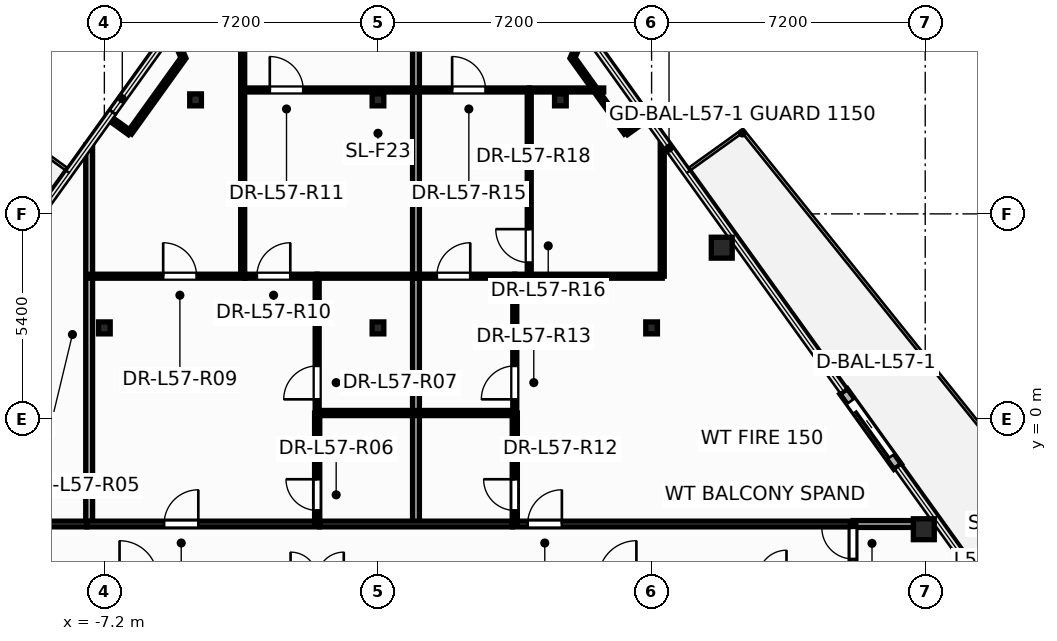
"""IFC4 building model, lengths in metres.
Left out: names, types, materials, properties, quantities, classifications, styles, units other than length and angle.
Written with IfcOpenShell. Run it as: python <this file> out.ifc"""

import sys

from ifc_helpers import new_model, si_unit, direction, frame, frame_2d, origin, origin_2d, place, context, subcontext, project, spatial, rectangle, hollow_circle, i_section, extrude, element, fill, save


model = new_model("IFC4")
c1 = context("Model", 3, precision=1e-05, world=origin(), true_north=direction((0.0, 1.0)))
c2 = subcontext(c1, "Body", "Model", "MODEL_VIEW")
j1 = project(units=[si_unit("LENGTHUNIT", "METRE"), si_unit("PLANEANGLEUNIT", "RADIAN")], contexts=[c1])
p1 = place(None, origin())
s1 = spatial("IfcSite", under=j1, at=p1, CompositionType="ELEMENT")
p2 = place(p1, origin())
s2 = spatial("IfcBuilding", under=s1, at=p2, CompositionType="ELEMENT")
p3 = place(p2, frame((0.0, 0.0, 218.1)))
s3 = spatial("IfcBuildingStorey", under=s2, at=p3, CompositionType="ELEMENT", Elevation=218.1)
for number, where, z_axis, x_axis in (
    (1, (14.363, -2.897, 0.0), (0.0, 0.0, 1.0), (1.0, 0.0, 0.0)),
    (2, (9.046, 4.51, 0.0), (0.0, 0.0, 1.0), (1.0, 0.0, 0.0)),
):
    element("IfcColumn", number, at=place(p3, frame(where, z_axis=z_axis, x_axis=x_axis)), inside=s3, PredefinedType="COLUMN", context=c2, shape_type="SweptSolid", body=[
        extrude(hollow_circle(Radius=0.275, WallThickness=0.024, at=origin_2d()), origin(), (0.0, 0.0, 1.0), 3.6),
    ])
for number, where, z_axis, x_axis in (
    (3, (-7.2, 2.4, 0.0), (0.0, 0.0, 1.0), (1.0, 0.0, 0.0)),
    (4, (0.0, 2.4, 0.0), (0.0, 0.0, 1.0), (1.0, 0.0, 0.0)),
    (5, (7.2, 2.4, 0.0), (0.0, 0.0, 1.0), (1.0, 0.0, 0.0)),
    (6, (-4.8, 8.4, 0.0), (0.0, 0.0, 1.0), (1.0, 0.0, 0.0)),
    (7, (0.0, 8.4, 0.0), (0.0, 0.0, 1.0), (1.0, 0.0, 0.0)),
    (8, (4.8, 8.4, 0.0), (0.0, 0.0, 1.0), (1.0, 0.0, 0.0)),
):
    element("IfcColumn", number, at=place(p3, frame(where, z_axis=z_axis, x_axis=x_axis)), inside=s3, PredefinedType="COLUMN", context=c2, shape_type="SweptSolid", body=[
        extrude(i_section(OverallWidth=0.307, OverallDepth=0.314, WebThickness=0.012, FlangeThickness=0.019, at=origin_2d()), origin(), (0.0, 0.0, 1.0), 3.6),
    ])
p4 = place(p3, frame((13.675, -1.252, -0.015), z_axis=(0.0, 0.0, 1.0), x_axis=(-0.583139062732, 0.812372349059, 0.0)))
e9 = element("IfcWall", 9, at=p4, inside=s3, PredefinedType="STANDARD", context=c2, shape_type="SweptSolid", body=[
    extrude(rectangle(XDim=2.44, YDim=0.24, at=frame_2d((1.22, 0.0))), origin(), (0.0, 0.0, 1.0), 2.878),
])
p5 = place(p4, frame((0.32, 0.0, 0.015)))
e10 = element("IfcOpeningElement", 10, at=p5, cuts=e9, PredefinedType="OPENING", context=c2, shape_type="SweptSolid", body=[
    extrude(rectangle(XDim=1.806, YDim=2.204, at=frame_2d((0.9, 1.102))), frame((0.0, 0.13, 0.0), z_axis=(0.0, -1.0, 0.0), x_axis=(1.0, 0.0, 0.0)), (0.0, 0.0, 1.0), 0.26),
])
p6 = place(p3, frame((3.54, -2.76, 0.0), z_axis=(0.0, 0.0, 1.0), x_axis=(1.0, 0.0, 0.0)))
e11 = element("IfcWall", 11, at=p6, inside=s3, PredefinedType="PARTITIONING", context=c2, shape_type="SweptSolid", body=[
    extrude(rectangle(XDim=8.96, YDim=0.15, at=frame_2d((4.48, 0.0))), origin(), (0.0, 0.0, 1.0), 2.32),
])
p7 = place(p6, frame((0.399, 0.0, 0.0)))
e12 = element("IfcOpeningElement", 12, at=p7, cuts=e11, PredefinedType="OPENING", context=c2, shape_type="SweptSolid", body=[
    extrude(rectangle(XDim=0.906, YDim=2.104, at=frame_2d((0.45, 1.052))), frame((0.0, 0.085, 0.0), z_axis=(0.0, -1.0, 0.0), x_axis=(1.0, 0.0, 0.0)), (0.0, 0.0, 1.0), 0.17),
])
p8 = place(p3, frame((-7.6, -2.76, 0.0), z_axis=(0.0, 0.0, 1.0), x_axis=(0.0, 1.0, 0.0)))
e13 = element("IfcWall", 13, at=p8, inside=s3, PredefinedType="PARTITIONING", context=c2, shape_type="SweptSolid", body=[
    extrude(rectangle(XDim=9.972, YDim=0.18, at=frame_2d((4.986, 0.0))), origin(), (0.0, 0.0, 1.0), 2.62),
])
p9 = place(p3, frame((-7.66, -2.76, 0.0), z_axis=(0.0, 0.0, 1.0), x_axis=(1.0, 0.0, 0.0)))
e14 = element("IfcWall", 14, at=p9, inside=s3, PredefinedType="PARTITIONING", context=c2, shape_type="SweptSolid", body=[
    extrude(rectangle(XDim=6.12, YDim=0.15, at=frame_2d((3.06, 0.0))), origin(), (0.0, 0.0, 1.0), 2.32),
])
p10 = place(p9, frame((2.032, 0.0, 0.0)))
e15 = element("IfcOpeningElement", 15, at=p10, cuts=e14, PredefinedType="OPENING", context=c2, shape_type="SweptSolid", body=[
    extrude(rectangle(XDim=0.906, YDim=2.104, at=frame_2d((0.45, 1.052))), frame((0.0, 0.085, 0.0), z_axis=(0.0, -1.0, 0.0), x_axis=(1.0, 0.0, 0.0)), (0.0, 0.0, 1.0), 0.17),
])
p11 = place(p3, frame((-3.56, 3.76, 0.0), z_axis=(0.0, 0.0, 1.0), x_axis=(0.0, 1.0, 0.0)))
e16 = element("IfcWall", 16, at=p11, inside=s3, PredefinedType="PARTITIONING", context=c2, shape_type="SweptSolid", body=[
    extrude(rectangle(XDim=9.08, YDim=0.105, at=frame_2d((4.54, 0.0))), origin(), (0.0, 0.0, 1.0), 2.62),
])
p12 = place(p3, frame((-12.5, -2.76, 0.0), z_axis=(0.0, 0.0, 1.0), x_axis=(1.0, 0.0, 0.0)))
e17 = element("IfcWall", 17, at=p12, inside=s3, PredefinedType="PARTITIONING", context=c2, shape_type="SweptSolid", body=[
    extrude(rectangle(XDim=4.838, YDim=0.15, at=frame_2d((2.419, 0.0))), origin(), (0.0, 0.0, 1.0), 3.345),
])
p13 = place(p12, frame((1.672, 0.0, 0.0)))
e18 = element("IfcOpeningElement", 18, at=p13, cuts=e17, PredefinedType="OPENING", context=c2, shape_type="SweptSolid", body=[
    extrude(rectangle(XDim=0.906, YDim=2.104, at=frame_2d((0.45, 1.052))), frame((0.0, 0.085, 0.0), z_axis=(0.0, -1.0, 0.0), x_axis=(1.0, 0.0, 0.0)), (0.0, 0.0, 1.0), 0.17),
])
p14 = place(p3, frame((1.0, -2.76, 0.0), z_axis=(0.0, 0.0, 1.0), x_axis=(0.0, 1.0, 0.0)))
e19 = element("IfcWall", 19, at=p14, inside=s3, PredefinedType="PARTITIONING", context=c2, shape_type="SweptSolid", body=[
    extrude(rectangle(XDim=16.313, YDim=0.18, at=frame_2d((8.156, 0.0))), origin(), (0.0, 0.0, 1.0), 2.32),
])
p15 = place(p3, frame((3.98, 3.76, 0.0), z_axis=(0.0, 0.0, 1.0), x_axis=(0.0, 1.0, 0.0)))
e20 = element("IfcWall", 20, at=p15, inside=s3, PredefinedType="PARTITIONING", context=c2, shape_type="SweptSolid", body=[
    extrude(rectangle(XDim=4.9, YDim=0.105, at=frame_2d((2.45, 0.0))), origin(), (0.0, 0.0, 1.0), 2.62),
])
p16 = place(p15, frame((0.359, 0.0, 0.0)))
e21 = element("IfcOpeningElement", 21, at=p16, cuts=e20, PredefinedType="OPENING", context=c2, shape_type="SweptSolid", body=[
    extrude(rectangle(XDim=0.886, YDim=2.104, at=frame_2d((0.44, 1.052))), frame((0.0, 0.062, 0.0), z_axis=(0.0, -1.0, 0.0), x_axis=(1.0, 0.0, 0.0)), (0.0, 0.0, 1.0), 0.125),
])
p17 = place(p3, frame((-3.56, 8.66, 0.0), z_axis=(0.0, 0.0, 1.0), x_axis=(1.0, 0.0, 0.0)))
e22 = element("IfcWall", 22, at=p17, inside=s3, PredefinedType="PARTITIONING", context=c2, shape_type="SweptSolid", body=[
    extrude(rectangle(XDim=4.56, YDim=0.105, at=frame_2d((2.28, 0.0))), origin(), (0.0, 0.0, 1.0), 3.345),
])
p18 = place(p17, frame((0.713, 0.0, 0.0)))
e23 = element("IfcOpeningElement", 23, at=p18, cuts=e22, PredefinedType="OPENING", context=c2, shape_type="SweptSolid", body=[
    extrude(rectangle(XDim=0.886, YDim=2.104, at=frame_2d((0.44, 1.052))), frame((0.0, 0.062, 0.0), z_axis=(0.0, -1.0, 0.0), x_axis=(1.0, 0.0, 0.0)), (0.0, 0.0, 1.0), 0.125),
])
p19 = place(p3, frame((-7.6, 3.76, 0.0), z_axis=(0.0, 0.0, 1.0), x_axis=(1.0, 0.0, 0.0)))
e24 = element("IfcWall", 24, at=p19, inside=s3, PredefinedType="PARTITIONING", context=c2, shape_type="SweptSolid", body=[
    extrude(rectangle(XDim=4.1, YDim=0.105, at=frame_2d((2.05, 0.0))), origin(), (0.0, 0.0, 1.0), 2.62),
])
p20 = place(p19, frame((1.948, 0.0, 0.0)))
e25 = element("IfcOpeningElement", 25, at=p20, cuts=e24, PredefinedType="OPENING", context=c2, shape_type="SweptSolid", body=[
    extrude(rectangle(XDim=0.886, YDim=2.104, at=frame_2d((0.44, 1.052))), frame((0.0, 0.062, 0.0), z_axis=(0.0, -1.0, 0.0), x_axis=(1.0, 0.0, 0.0)), (0.0, 0.0, 1.0), 0.125),
])
p21 = place(p3, frame((7.48, 3.76, 0.0), z_axis=(0.0, 0.0, 1.0), x_axis=(0.0, 1.0, 0.0)))
e26 = element("IfcWall", 26, at=p21, inside=s3, PredefinedType="PARTITIONING", context=c2, shape_type="SweptSolid", body=[
    extrude(rectangle(XDim=3.619, YDim=0.105, at=frame_2d((1.81, 0.0))), origin(), (0.0, 0.0, 1.0), 2.62),
])
p22 = place(p3, frame((-1.6, 0.16, 0.0), z_axis=(0.0, 0.0, 1.0), x_axis=(0.0, 1.0, 0.0)))
e27 = element("IfcWall", 27, at=p22, inside=s3, PredefinedType="PARTITIONING", context=c2, shape_type="SweptSolid", body=[
    extrude(rectangle(XDim=3.6, YDim=0.105, at=frame_2d((1.8, 0.0))), origin(), (0.0, 0.0, 1.0), 2.32),
])
p23 = place(p22, frame((0.36, 0.0, 0.0)))
e28 = element("IfcOpeningElement", 28, at=p23, cuts=e27, PredefinedType="OPENING", context=c2, shape_type="SweptSolid", body=[
    extrude(rectangle(XDim=0.886, YDim=2.104, at=frame_2d((0.44, 1.052))), frame((0.0, 0.062, 0.0), z_axis=(0.0, -1.0, 0.0), x_axis=(1.0, 0.0, 0.0)), (0.0, 0.0, 1.0), 0.125),
])
p24 = place(p3, frame((3.6, 0.16, 0.0), z_axis=(0.0, 0.0, 1.0), x_axis=(0.0, 1.0, 0.0)))
e29 = element("IfcWall", 29, at=p24, inside=s3, PredefinedType="PARTITIONING", context=c2, shape_type="SweptSolid", body=[
    extrude(rectangle(XDim=3.6, YDim=0.105, at=frame_2d((1.8, 0.0))), origin(), (0.0, 0.0, 1.0), 2.32),
])
p25 = place(p24, frame((0.36, 0.0, 0.0)))
e30 = element("IfcOpeningElement", 30, at=p25, cuts=e29, PredefinedType="OPENING", context=c2, shape_type="SweptSolid", body=[
    extrude(rectangle(XDim=0.886, YDim=2.104, at=frame_2d((0.44, 1.052))), frame((0.0, 0.062, 0.0), z_axis=(0.0, -1.0, 0.0), x_axis=(1.0, 0.0, 0.0)), (0.0, 0.0, 1.0), 0.125),
])
p26 = place(p3, frame((3.6, 3.76, 0.0), z_axis=(0.0, 0.0, 1.0), x_axis=(1.0, 0.0, 0.0)))
e31 = element("IfcWall", 31, at=p26, inside=s3, PredefinedType="PARTITIONING", context=c2, shape_type="SweptSolid", body=[
    extrude(rectangle(XDim=3.88, YDim=0.105, at=frame_2d((1.94, 0.0))), origin(), (0.0, 0.0, 1.0), 2.62),
])
p27 = place(p3, frame((1.0, 8.66, 0.0), z_axis=(0.0, 0.0, 1.0), x_axis=(1.0, 0.0, 0.0)))
e32 = element("IfcWall", 32, at=p27, inside=s3, PredefinedType="PARTITIONING", context=c2, shape_type="SweptSolid", body=[
    extrude(rectangle(XDim=2.98, YDim=0.105, at=frame_2d((1.49, 0.0))), origin(), (0.0, 0.0, 1.0), 3.345),
])
p28 = place(p27, frame((0.951, 0.0, 0.0)))
e33 = element("IfcOpeningElement", 33, at=p28, cuts=e32, PredefinedType="OPENING", context=c2, shape_type="SweptSolid", body=[
    extrude(rectangle(XDim=0.886, YDim=2.104, at=frame_2d((0.44, 1.052))), frame((0.0, 0.062, 0.0), z_axis=(0.0, -1.0, 0.0), x_axis=(1.0, 0.0, 0.0)), (0.0, 0.0, 1.0), 0.125),
])
p29 = place(p3, frame((-1.6, -2.76, 0.0), z_axis=(0.0, 0.0, 1.0), x_axis=(0.0, 1.0, 0.0)))
e34 = element("IfcWall", 34, at=p29, inside=s3, PredefinedType="PARTITIONING", context=c2, shape_type="SweptSolid", body=[
    extrude(rectangle(XDim=2.92, YDim=0.135, at=frame_2d((1.46, 0.0))), origin(), (0.0, 0.0, 1.0), 3.345),
])
p30 = place(p29, frame((0.357, 0.0, 0.0)))
e35 = element("IfcOpeningElement", 35, at=p30, cuts=e34, PredefinedType="OPENING", context=c2, shape_type="SweptSolid", body=[
    extrude(rectangle(XDim=0.826, YDim=2.104, at=frame_2d((0.41, 1.052))), frame((0.0, 0.078, 0.0), z_axis=(0.0, -1.0, 0.0), x_axis=(1.0, 0.0, 0.0)), (0.0, 0.0, 1.0), 0.155),
])
p31 = place(p3, frame((3.6, -2.76, 0.0), z_axis=(0.0, 0.0, 1.0), x_axis=(0.0, 1.0, 0.0)))
e36 = element("IfcWall", 36, at=p31, inside=s3, PredefinedType="PARTITIONING", context=c2, shape_type="SweptSolid", body=[
    extrude(rectangle(XDim=2.92, YDim=0.135, at=frame_2d((1.46, 0.0))), origin(), (0.0, 0.0, 1.0), 2.964),
])
p32 = place(p31, frame((0.357, 0.0, 0.0)))
e37 = element("IfcOpeningElement", 37, at=p32, cuts=e36, PredefinedType="OPENING", context=c2, shape_type="SweptSolid", body=[
    extrude(rectangle(XDim=0.826, YDim=2.104, at=frame_2d((0.41, 1.052))), frame((0.0, 0.078, 0.0), z_axis=(0.0, -1.0, 0.0), x_axis=(1.0, 0.0, 0.0)), (0.0, 0.0, 1.0), 0.155),
])
p33 = place(p3, frame((-1.538, -2.76, 0.0), z_axis=(0.0, 0.0, 1.0), x_axis=(1.0, 0.0, 0.0)))
e38 = element("IfcWall", 38, at=p33, inside=s3, PredefinedType="PARTITIONING", context=c2, shape_type="SweptSolid", body=[
    extrude(rectangle(XDim=5.076, YDim=0.15, at=frame_2d((2.538, 0.0))), origin(), (0.0, 0.0, 1.0), 2.32),
])
p34 = place(p3, frame((-1.6, 0.16, 0.0), z_axis=(0.0, 0.0, 1.0), x_axis=(1.0, 0.0, 0.0)))
e39 = element("IfcWall", 39, at=p34, inside=s3, PredefinedType="PARTITIONING", context=c2, shape_type="SweptSolid", body=[
    extrude(rectangle(XDim=5.2, YDim=0.135, at=frame_2d((2.6, 0.0))), origin(), (0.0, 0.0, 1.0), 2.32),
])
p35 = place(p3, frame((-1.6, 3.76, 0.0), z_axis=(0.0, 0.0, 1.0), x_axis=(1.0, 0.0, 0.0)))
e40 = element("IfcWall", 40, at=p35, inside=s3, PredefinedType="PARTITIONING", context=c2, shape_type="SweptSolid", body=[
    extrude(rectangle(XDim=2.6, YDim=0.105, at=frame_2d((1.3, 0.0))), origin(), (0.0, 0.0, 1.0), 2.32),
])
p36 = place(p3, frame((1.0, 3.76, 0.0), z_axis=(0.0, 0.0, 1.0), x_axis=(1.0, 0.0, 0.0)))
e41 = element("IfcWall", 41, at=p36, inside=s3, PredefinedType="PARTITIONING", context=c2, shape_type="SweptSolid", body=[
    extrude(rectangle(XDim=2.6, YDim=0.105, at=frame_2d((1.3, 0.0))), origin(), (0.0, 0.0, 1.0), 2.964),
])
p37 = place(p36, frame((0.548, 0.0, 0.0)))
e42 = element("IfcOpeningElement", 42, at=p37, cuts=e41, PredefinedType="OPENING", context=c2, shape_type="SweptSolid", body=[
    extrude(rectangle(XDim=0.886, YDim=2.104, at=frame_2d((0.44, 1.052))), frame((0.0, 0.062, 0.0), z_axis=(0.0, -1.0, 0.0), x_axis=(1.0, 0.0, 0.0)), (0.0, 0.0, 1.0), 0.125),
])
for number, where, z_axis, x_axis in (
    (43, (-5.12, 9.501, 0.0), (0.0, 0.0, 1.0), (-0.583, -0.812, 0.0)),
    (44, (6.531, 7.534, 0.0), (0.0, 0.0, 1.0), (-0.583, 0.812, 0.0)),
):
    element("IfcWall", number, at=place(p3, frame(where, z_axis=z_axis, x_axis=x_axis)), inside=s3, PredefinedType="PARTITIONING", context=c2, shape_type="SweptSolid", body=[
        extrude(rectangle(XDim=2.421, YDim=0.12, at=frame_2d((1.21, 0.0))), origin(), (0.0, 0.0, 1.0), 3.345),
    ])
p38 = place(p3, frame((12.5, -2.76, 0.0), z_axis=(0.0, 0.0, 1.0), x_axis=(1.0, 0.0, 0.0)))
e45 = element("IfcWall", 45, at=p38, inside=s3, PredefinedType="PARTITIONING", context=c2, shape_type="SweptSolid", body=[
    extrude(rectangle(XDim=2.257, YDim=0.18, at=frame_2d((1.129, 0.0))), origin(), (0.0, 0.0, 1.0), 2.62),
])
p39 = place(p3, frame((-3.498, 3.76, 0.0), z_axis=(0.0, 0.0, 1.0), x_axis=(1.0, 0.0, 0.0)))
e46 = element("IfcWall", 46, at=p39, inside=s3, PredefinedType="PARTITIONING", context=c2, shape_type="SweptSolid", body=[
    extrude(rectangle(XDim=1.898, YDim=0.105, at=frame_2d((0.949, 0.0))), origin(), (0.0, 0.0, 1.0), 2.964),
])
p40 = place(p39, frame((0.311, 0.0, 0.0)))
e47 = element("IfcOpeningElement", 47, at=p40, cuts=e46, PredefinedType="OPENING", context=c2, shape_type="SweptSolid", body=[
    extrude(rectangle(XDim=0.886, YDim=2.104, at=frame_2d((0.44, 1.052))), frame((0.0, 0.062, 0.0), z_axis=(0.0, -1.0, 0.0), x_axis=(1.0, 0.0, 0.0)), (0.0, 0.0, 1.0), 0.125),
])
p41 = place(p3, frame((3.98, 8.66, 0.0), z_axis=(0.0, 0.0, 1.0), x_axis=(1.0, 0.0, 0.0)))
e48 = element("IfcWall", 48, at=p41, inside=s3, PredefinedType="PARTITIONING", context=c2, shape_type="SweptSolid", body=[
    extrude(rectangle(XDim=1.96, YDim=0.105, at=frame_2d((0.98, 0.0))), origin(), (0.0, 0.0, 1.0), 2.62),
])
p42 = place(p3, frame((12.5, -4.24, 0.0), z_axis=(0.0, 0.0, 1.0), x_axis=(0.0, 1.0, 0.0)))
e49 = element("IfcWall", 49, at=p42, inside=s3, PredefinedType="PARTITIONING", context=c2, shape_type="SweptSolid", body=[
    extrude(rectangle(XDim=1.48, YDim=0.15, at=frame_2d((0.74, 0.0))), origin(), (0.0, 0.0, 1.0), 2.32),
])
p43 = place(p42, frame((0.56, 0.0, 0.0)))
e50 = element("IfcOpeningElement", 50, at=p43, cuts=e49, PredefinedType="OPENING", context=c2, shape_type="SweptSolid", body=[
    extrude(rectangle(XDim=0.826, YDim=2.104, at=frame_2d((0.41, 1.052))), frame((0.0, 0.085, 0.0), z_axis=(0.0, -1.0, 0.0), x_axis=(1.0, 0.0, 0.0)), (0.0, 0.0, 1.0), 0.17),
])
for number, where, z_axis, x_axis in (
    (51, (-5.423, 10.227, 0.0), (0.0, 0.0, 1.0), (0.386, -0.923, 0.0)),
    (52, (5.12, 9.501, 0.0), (0.0, 0.0, 1.0), (0.386, 0.923, 0.0)),
):
    element("IfcWall", number, at=place(p3, frame(where, z_axis=z_axis, x_axis=x_axis)), inside=s3, PredefinedType="PARTITIONING", context=c2, shape_type="SweptSolid", body=[
        extrude(rectangle(XDim=0.787, YDim=0.12, at=frame_2d((0.394, 0.0))), origin(), (0.0, 0.0, 1.0), 2.863),
    ])
for number, where, z_axis, x_axis in (
    (53, (-6.531, 7.534, 0.0), (0.0, 0.0, 1.0), (-0.812, 0.583, 0.0)),
    (54, (7.076, 7.925, 0.0), (0.0, 0.0, 1.0), (-0.812, -0.583, 0.0)),
):
    element("IfcWall", number, at=place(p3, frame(where, z_axis=z_axis, x_axis=x_axis)), inside=s3, PredefinedType="PARTITIONING", context=c2, shape_type="SweptSolid", body=[
        extrude(rectangle(XDim=0.67, YDim=0.12, at=frame_2d((0.335, 0.0))), origin(), (0.0, 0.0, 1.0), 2.863),
    ])
p44 = place(p5, origin())
e55 = element("IfcDoor", 55, at=p44, inside=s3, OperationType="SLIDING_TO_LEFT", PredefinedType="DOOR", context=c2, shape_type="SweptSolid", body=[
    extrude(rectangle(XDim=1.8, YDim=2.2, at=frame_2d((0.9, 1.1))), frame((0.0, 0.025, 0.0), z_axis=(0.0, -1.0, 0.0), x_axis=(1.0, 0.0, 0.0)), (0.0, 0.0, 1.0), 0.05),
])
fill(e10, e55)
p45 = place(p43, origin())
e56 = element("IfcDoor", 56, at=p45, inside=s3, OperationType="SINGLE_SWING_RIGHT", PredefinedType="DOOR", context=c2, shape_type="SweptSolid", body=[
    extrude(rectangle(XDim=0.82, YDim=2.1, at=frame_2d((0.41, 1.05))), frame((0.0, 0.025, 0.0), z_axis=(0.0, -1.0, 0.0), x_axis=(1.0, 0.0, 0.0)), (0.0, 0.0, 1.0), 0.05),
])
fill(e50, e56)
p46 = place(p30, origin())
e57 = element("IfcDoor", 57, at=p46, inside=s3, OperationType="SINGLE_SWING_RIGHT", PredefinedType="DOOR", context=c2, shape_type="SweptSolid", body=[
    extrude(rectangle(XDim=0.82, YDim=2.1, at=frame_2d((0.41, 1.05))), frame((0.0, 0.025, 0.0), z_axis=(0.0, -1.0, 0.0), x_axis=(1.0, 0.0, 0.0)), (0.0, 0.0, 1.0), 0.05),
])
fill(e35, e57)
p47 = place(p23, origin())
e58 = element("IfcDoor", 58, at=p47, inside=s3, OperationType="SINGLE_SWING_LEFT", PredefinedType="DOOR", context=c2, shape_type="SweptSolid", body=[
    extrude(rectangle(XDim=0.88, YDim=2.1, at=frame_2d((0.44, 1.05))), frame((0.0, 0.025, 0.0), z_axis=(0.0, -1.0, 0.0), x_axis=(1.0, 0.0, 0.0)), (0.0, 0.0, 1.0), 0.05),
])
fill(e28, e58)
p48 = place(p10, origin())
e59 = element("IfcDoor", 59, at=p48, inside=s3, OperationType="SINGLE_SWING_RIGHT", PredefinedType="DOOR", context=c2, shape_type="SweptSolid", body=[
    extrude(rectangle(XDim=0.9, YDim=2.1, at=frame_2d((0.45, 1.05))), frame((0.0, 0.025, 0.0), z_axis=(0.0, -1.0, 0.0), x_axis=(1.0, 0.0, 0.0)), (0.0, 0.0, 1.0), 0.05),
])
fill(e15, e59)
p49 = place(p20, origin())
e60 = element("IfcDoor", 60, at=p49, inside=s3, OperationType="SINGLE_SWING_LEFT", PredefinedType="DOOR", context=c2, shape_type="SweptSolid", body=[
    extrude(rectangle(XDim=0.88, YDim=2.1, at=frame_2d((0.44, 1.05))), frame((0.0, 0.025, 0.0), z_axis=(0.0, -1.0, 0.0), x_axis=(1.0, 0.0, 0.0)), (0.0, 0.0, 1.0), 0.05),
])
fill(e25, e60)
p50 = place(p40, origin())
e61 = element("IfcDoor", 61, at=p50, inside=s3, OperationType="SINGLE_SWING_RIGHT", PredefinedType="DOOR", context=c2, shape_type="SweptSolid", body=[
    extrude(rectangle(XDim=0.88, YDim=2.1, at=frame_2d((0.44, 1.05))), frame((0.0, 0.025, 0.0), z_axis=(0.0, -1.0, 0.0), x_axis=(1.0, 0.0, 0.0)), (0.0, 0.0, 1.0), 0.05),
])
fill(e47, e61)
p51 = place(p18, origin())
e62 = element("IfcDoor", 62, at=p51, inside=s3, OperationType="SINGLE_SWING_LEFT", PredefinedType="DOOR", context=c2, shape_type="SweptSolid", body=[
    extrude(rectangle(XDim=0.88, YDim=2.1, at=frame_2d((0.44, 1.05))), frame((0.0, 0.025, 0.0), z_axis=(0.0, -1.0, 0.0), x_axis=(1.0, 0.0, 0.0)), (0.0, 0.0, 1.0), 0.05),
])
fill(e23, e62)
p52 = place(p32, origin())
e63 = element("IfcDoor", 63, at=p52, inside=s3, OperationType="SINGLE_SWING_RIGHT", PredefinedType="DOOR", context=c2, shape_type="SweptSolid", body=[
    extrude(rectangle(XDim=0.82, YDim=2.1, at=frame_2d((0.41, 1.05))), frame((0.0, 0.025, 0.0), z_axis=(0.0, -1.0, 0.0), x_axis=(1.0, 0.0, 0.0)), (0.0, 0.0, 1.0), 0.05),
])
fill(e37, e63)
p53 = place(p25, origin())
e64 = element("IfcDoor", 64, at=p53, inside=s3, OperationType="SINGLE_SWING_LEFT", PredefinedType="DOOR", context=c2, shape_type="SweptSolid", body=[
    extrude(rectangle(XDim=0.88, YDim=2.1, at=frame_2d((0.44, 1.05))), frame((0.0, 0.025, 0.0), z_axis=(0.0, -1.0, 0.0), x_axis=(1.0, 0.0, 0.0)), (0.0, 0.0, 1.0), 0.05),
])
fill(e30, e64)
p54 = place(p7, origin())
e65 = element("IfcDoor", 65, at=p54, inside=s3, OperationType="SINGLE_SWING_RIGHT", PredefinedType="DOOR", context=c2, shape_type="SweptSolid", body=[
    extrude(rectangle(XDim=0.9, YDim=2.1, at=frame_2d((0.45, 1.05))), frame((0.0, 0.025, 0.0), z_axis=(0.0, -1.0, 0.0), x_axis=(1.0, 0.0, 0.0)), (0.0, 0.0, 1.0), 0.05),
])
fill(e12, e65)
p55 = place(p28, origin())
e66 = element("IfcDoor", 66, at=p55, inside=s3, OperationType="SINGLE_SWING_LEFT", PredefinedType="DOOR", context=c2, shape_type="SweptSolid", body=[
    extrude(rectangle(XDim=0.88, YDim=2.1, at=frame_2d((0.44, 1.05))), frame((0.0, 0.025, 0.0), z_axis=(0.0, -1.0, 0.0), x_axis=(1.0, 0.0, 0.0)), (0.0, 0.0, 1.0), 0.05),
])
fill(e33, e66)
p56 = place(p16, origin())
e67 = element("IfcDoor", 67, at=p56, inside=s3, OperationType="SINGLE_SWING_RIGHT", PredefinedType="DOOR", context=c2, shape_type="SweptSolid", body=[
    extrude(rectangle(XDim=0.88, YDim=2.1, at=frame_2d((0.44, 1.05))), frame((0.0, 0.025, 0.0), z_axis=(0.0, -1.0, 0.0), x_axis=(1.0, 0.0, 0.0)), (0.0, 0.0, 1.0), 0.05),
])
fill(e21, e67)
p57 = place(p37, origin())
e68 = element("IfcDoor", 68, at=p57, inside=s3, OperationType="SINGLE_SWING_RIGHT", PredefinedType="DOOR", context=c2, shape_type="SweptSolid", body=[
    extrude(rectangle(XDim=0.88, YDim=2.1, at=frame_2d((0.44, 1.05))), frame((0.0, 0.025, 0.0), z_axis=(0.0, -1.0, 0.0), x_axis=(1.0, 0.0, 0.0)), (0.0, 0.0, 1.0), 0.05),
])
fill(e42, e68)
save(model, sys.argv[1])
